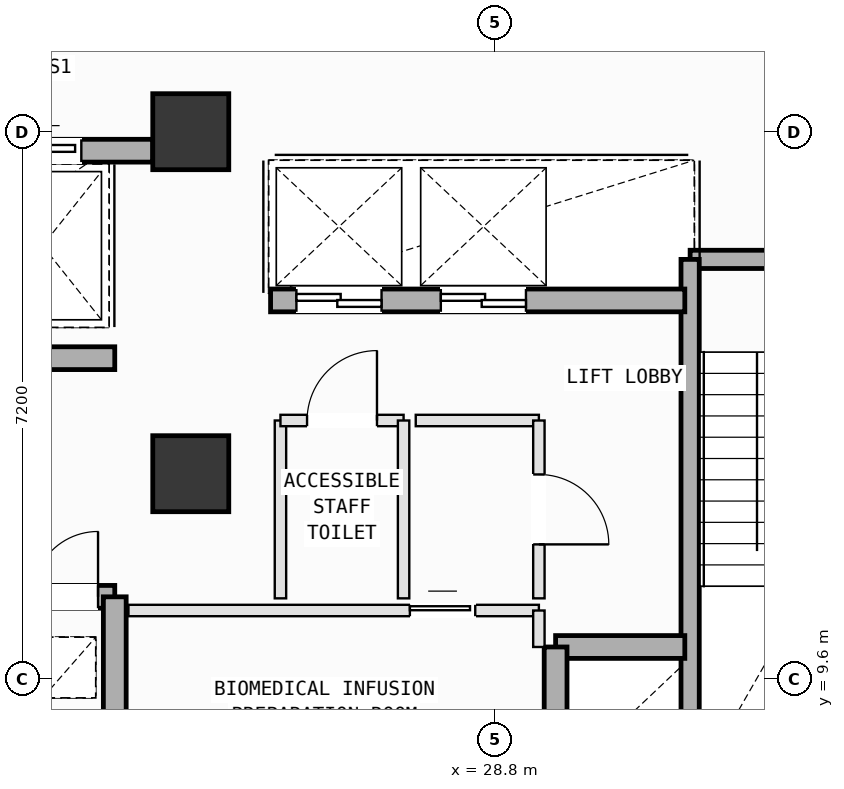
"""IFC4 building model, lengths in metres.
Left out: names, types, materials, properties, quantities, classifications, styles, units other than length and angle.
Written with IfcOpenShell. Run it as: python <this file> out.ifc"""

import sys

from ifc_helpers import new_model, si_unit, direction, frame, frame_2d, origin, origin_2d, place, context, subcontext, project, spatial, rectangle, extrude, element, fill, save


model = new_model("IFC4")
c1 = context("Model", 3, precision=1e-05, world=origin(), true_north=direction((0.0, 1.0)))
c2 = subcontext(c1, "Body", "Model", "MODEL_VIEW")
j1 = project(units=[si_unit("LENGTHUNIT", "METRE"), si_unit("PLANEANGLEUNIT", "RADIAN")], contexts=[c1])
p1 = place(None, origin())
s1 = spatial("IfcSite", under=j1, at=p1, CompositionType="ELEMENT")
p2 = place(p1, origin())
s2 = spatial("IfcBuilding", under=s1, at=p2, CompositionType="ELEMENT")
p3 = place(p2, frame((0.0, 0.0, 251.2)))
s3 = spatial("IfcBuildingStorey", under=s2, at=p3, CompositionType="ELEMENT", Elevation=251.2)
for number, where, z_axis, x_axis in (
    (1, (24.8, 12.3, 0.0), (0.0, 0.0, 1.0), (1.0, 0.0, 0.0)),
    (2, (24.8, 16.8, 0.0), (0.0, 0.0, 1.0), (1.0, 0.0, 0.0)),
):
    element("IfcColumn", number, at=place(p3, frame(where, z_axis=z_axis, x_axis=x_axis)), inside=s3, PredefinedType="COLUMN", context=c2, shape_type="SweptSolid", body=[
        extrude(rectangle(XDim=1.0, YDim=1.0, at=origin_2d()), origin(), (0.0, 0.0, 1.0), 4.0),
    ])
p4 = place(p3, frame((31.37, 15.12, 0.0), z_axis=(0.0, 0.0, 1.0), x_axis=(1.0, 0.0, 0.0)))
e3 = element("IfcWall", 3, at=p4, inside=s3, PredefinedType="SOLIDWALL", context=c2, shape_type="SweptSolid", body=[
    extrude(rectangle(XDim=3.46, YDim=0.24, at=frame_2d((1.73, 0.0))), origin(), (0.0, 0.0, 1.0), 3.78),
])
p5 = place(p4, frame((2.14, 0.0, 0.0)))
e4 = element("IfcOpeningElement", 4, at=p5, cuts=e3, PredefinedType="OPENING", context=c2, shape_type="SweptSolid", body=[
    extrude(rectangle(XDim=1.1, YDim=2.15, at=frame_2d((0.55, 1.075))), frame((0.0, 0.13, 0.0), z_axis=(0.0, -1.0, 0.0), x_axis=(1.0, 0.0, 0.0)), (0.0, 0.0, 1.0), 0.26),
])
p6 = place(p3, frame((31.37, 8.075, 0.0), z_axis=(0.0, 0.0, 1.0), x_axis=(0.0, 1.0, 0.0)))
e5 = element("IfcWall", 5, at=p6, inside=s3, PredefinedType="SOLIDWALL", context=c2, shape_type="SweptSolid", body=[
    extrude(rectangle(XDim=7.045, YDim=0.24, at=frame_2d((3.522, 0.0))), origin(), (0.0, 0.0, 1.0), 3.78),
])
p7 = place(p3, frame((19.85, 16.55, 0.0), z_axis=(0.0, 0.0, 1.0), x_axis=(1.0, 0.0, 0.0)))
e6 = element("IfcWall", 6, at=p7, inside=s3, PredefinedType="SOLIDWALL", context=c2, shape_type="SweptSolid", body=[
    extrude(rectangle(XDim=4.45, YDim=0.3, at=frame_2d((2.225, 0.0))), origin(), (0.0, 0.0, 1.0), 3.78),
])
p8 = place(p7, frame((0.475, 0.0, 0.0)))
e7 = element("IfcOpeningElement", 7, at=p8, cuts=e6, PredefinedType="OPENING", context=c2, shape_type="SweptSolid", body=[
    extrude(rectangle(XDim=1.25, YDim=2.18, at=frame_2d((0.625, 1.09))), frame((0.0, 0.16, 0.0), z_axis=(0.0, -1.0, 0.0), x_axis=(1.0, 0.0, 0.0)), (0.0, 0.0, 1.0), 0.32),
])
p9 = place(p7, frame((2.49, 0.0, 0.0)))
e8 = element("IfcOpeningElement", 8, at=p9, cuts=e6, PredefinedType="OPENING", context=c2, shape_type="SweptSolid", body=[
    extrude(rectangle(XDim=1.02, YDim=2.12, at=frame_2d((0.51, 1.06))), frame((0.0, 0.16, 0.0), z_axis=(0.0, -1.0, 0.0), x_axis=(1.0, 0.0, 0.0)), (0.0, 0.0, 1.0), 0.32),
])
p10 = place(p3, frame((18.5, 10.68, 0.0), z_axis=(0.0, 0.0, 1.0), x_axis=(1.0, 0.0, 0.0)))
e9 = element("IfcWall", 9, at=p10, inside=s3, PredefinedType="SOLIDWALL", context=c2, shape_type="SweptSolid", body=[
    extrude(rectangle(XDim=5.3, YDim=0.3, at=frame_2d((2.65, 0.0))), origin(), (0.0, 0.0, 1.0), 3.78),
])
p11 = place(p10, frame((4.22, 0.0, 0.0)))
e10 = element("IfcOpeningElement", 10, at=p11, cuts=e9, PredefinedType="OPENING", context=c2, shape_type="SweptSolid", body=[
    extrude(rectangle(XDim=0.86, YDim=2.06, at=frame_2d((0.43, 1.03))), frame((0.0, 0.16, 0.0), z_axis=(0.0, -1.0, 0.0), x_axis=(1.0, 0.0, 0.0)), (0.0, 0.0, 1.0), 0.32),
])
p12 = place(p10, frame((0.425, 0.0, 0.0)))
e11 = element("IfcOpeningElement", 11, at=p12, cuts=e9, PredefinedType="OPENING", context=c2, shape_type="SweptSolid", body=[
    extrude(rectangle(XDim=1.25, YDim=2.18, at=frame_2d((0.625, 1.09))), frame((0.0, 0.16, 0.0), z_axis=(0.0, -1.0, 0.0), x_axis=(1.0, 0.0, 0.0)), (0.0, 0.0, 1.0), 0.32),
])
p13 = place(p10, frame((2.525, 0.0, 0.0)))
e12 = element("IfcOpeningElement", 12, at=p13, cuts=e9, PredefinedType="OPENING", context=c2, shape_type="SweptSolid", body=[
    extrude(rectangle(XDim=1.25, YDim=2.18, at=frame_2d((0.625, 1.09))), frame((0.0, 0.16, 0.0), z_axis=(0.0, -1.0, 0.0), x_axis=(1.0, 0.0, 0.0)), (0.0, 0.0, 1.0), 0.32),
])
p14 = place(p3, frame((18.5, 13.82, 0.0), z_axis=(0.0, 0.0, 1.0), x_axis=(1.0, 0.0, 0.0)))
e13 = element("IfcWall", 13, at=p14, inside=s3, PredefinedType="SOLIDWALL", context=c2, shape_type="SweptSolid", body=[
    extrude(rectangle(XDim=5.3, YDim=0.3, at=frame_2d((2.65, 0.0))), origin(), (0.0, 0.0, 1.0), 3.78),
])
p15 = place(p14, frame((0.18, 0.0, 0.0)))
e14 = element("IfcOpeningElement", 14, at=p15, cuts=e13, PredefinedType="OPENING", context=c2, shape_type="SweptSolid", body=[
    extrude(rectangle(XDim=1.1, YDim=2.15, at=frame_2d((0.55, 1.075))), frame((0.0, 0.16, 0.0), z_axis=(0.0, -1.0, 0.0), x_axis=(1.0, 0.0, 0.0)), (0.0, 0.0, 1.0), 0.32),
])
p16 = place(p3, frame((23.8, 8.075, 0.0), z_axis=(0.0, 0.0, 1.0), x_axis=(0.0, 1.0, 0.0)))
e15 = element("IfcWall", 15, at=p16, inside=s3, PredefinedType="SOLIDWALL", context=c2, shape_type="SweptSolid", body=[
    extrude(rectangle(XDim=2.605, YDim=0.3, at=frame_2d((1.302, 0.0))), origin(), (0.0, 0.0, 1.0), 3.78),
])
p17 = place(p3, frame((29.6, 10.02, 0.0), z_axis=(0.0, 0.0, 1.0), x_axis=(1.0, 0.0, 0.0)))
e16 = element("IfcWall", 16, at=p17, inside=s3, PredefinedType="SOLIDWALL", context=c2, shape_type="SweptSolid", body=[
    extrude(rectangle(XDim=1.7, YDim=0.3, at=frame_2d((0.85, 0.0))), origin(), (0.0, 0.0, 1.0), 3.78),
])
p18 = place(p3, frame((29.6, 8.075, 0.0), z_axis=(0.0, 0.0, 1.0), x_axis=(0.0, 1.0, 0.0)))
e17 = element("IfcWall", 17, at=p18, inside=s3, PredefinedType="SOLIDWALL", context=c2, shape_type="SweptSolid", body=[
    extrude(rectangle(XDim=1.945, YDim=0.3, at=frame_2d((0.973, 0.0))), origin(), (0.0, 0.0, 1.0), 3.78),
])
p19 = place(p3, frame((25.85, 14.58, 0.0), z_axis=(0.0, 0.0, 1.0), x_axis=(1.0, 0.0, 0.0)))
e18 = element("IfcWall", 18, at=p19, inside=s3, PredefinedType="SOLIDWALL", context=c2, shape_type="SweptSolid", body=[
    extrude(rectangle(XDim=5.45, YDim=0.3, at=frame_2d((2.725, 0.0))), origin(), (0.0, 0.0, 1.0), 3.78),
])
p20 = place(p19, frame((0.34, 0.0, 0.0)))
e19 = element("IfcOpeningElement", 19, at=p20, cuts=e18, PredefinedType="OPENING", context=c2, shape_type="SweptSolid", body=[
    extrude(rectangle(XDim=1.12, YDim=2.15, at=frame_2d((0.56, 1.075))), frame((0.0, 0.16, 0.0), z_axis=(0.0, -1.0, 0.0), x_axis=(1.0, 0.0, 0.0)), (0.0, 0.0, 1.0), 0.32),
])
p21 = place(p19, frame((2.24, 0.0, 0.0)))
e20 = element("IfcOpeningElement", 20, at=p21, cuts=e18, PredefinedType="OPENING", context=c2, shape_type="SweptSolid", body=[
    extrude(rectangle(XDim=1.12, YDim=2.15, at=frame_2d((0.56, 1.075))), frame((0.0, 0.16, 0.0), z_axis=(0.0, -1.0, 0.0), x_axis=(1.0, 0.0, 0.0)), (0.0, 0.0, 1.0), 0.32),
])
p22 = place(p3, frame((23.98, 10.5, 0.0), z_axis=(0.0, 0.0, 1.0), x_axis=(1.0, 0.0, 0.0)))
e21 = element("IfcWall", 21, at=p22, inside=s3, PredefinedType="PARTITIONING", context=c2, shape_type="SweptSolid", body=[
    extrude(rectangle(XDim=5.4, YDim=0.15, at=frame_2d((2.7, 0.0))), origin(), (0.0, 0.0, 1.0), 3.78),
])
p23 = place(p22, frame((3.703, 0.0, 0.0)))
e22 = element("IfcOpeningElement", 22, at=p23, cuts=e21, PredefinedType="OPENING", context=c2, shape_type="SweptSolid", body=[
    extrude(rectangle(XDim=0.86, YDim=2.06, at=frame_2d((0.43, 1.03))), frame((0.0, 0.085, 0.0), z_axis=(0.0, -1.0, 0.0), x_axis=(1.0, 0.0, 0.0)), (0.0, 0.0, 1.0), 0.17),
])
p24 = place(p3, frame((29.38, 10.5, 0.0), z_axis=(0.0, 0.0, 1.0), x_axis=(0.0, -1.0, 0.0)))
e23 = element("IfcWall", 23, at=p24, inside=s3, PredefinedType="PARTITIONING", context=c2, shape_type="SweptSolid", body=[
    extrude(rectangle(XDim=0.48, YDim=0.15, at=frame_2d((0.24, 0.0))), origin(), (0.0, 0.0, 1.0), 3.78),
])
p25 = place(p3, frame((25.98, 10.66, 0.0), z_axis=(0.0, 0.0, 1.0), x_axis=(0.0, 1.0, 0.0)))
e24 = element("IfcWall", 24, at=p25, inside=s3, PredefinedType="PARTITIONING", context=c2, shape_type="SweptSolid", body=[
    extrude(rectangle(XDim=2.34, YDim=0.15, at=frame_2d((1.17, 0.0))), origin(), (0.0, 0.0, 1.0), 3.78),
])
p26 = place(p3, frame((25.98, 13.0, 0.0), z_axis=(0.0, 0.0, 1.0), x_axis=(1.0, 0.0, 0.0)))
e25 = element("IfcWall", 25, at=p26, inside=s3, PredefinedType="PARTITIONING", context=c2, shape_type="SweptSolid", body=[
    extrude(rectangle(XDim=1.62, YDim=0.15, at=frame_2d((0.81, 0.0))), origin(), (0.0, 0.0, 1.0), 3.78),
])
p27 = place(p26, frame((0.35, 0.0, 0.0)))
e26 = element("IfcOpeningElement", 26, at=p27, cuts=e25, PredefinedType="OPENING", context=c2, shape_type="SweptSolid", body=[
    extrude(rectangle(XDim=0.92, YDim=2.1, at=frame_2d((0.46, 1.05))), frame((0.0, 0.085, 0.0), z_axis=(0.0, -1.0, 0.0), x_axis=(1.0, 0.0, 0.0)), (0.0, 0.0, 1.0), 0.17),
])
p28 = place(p3, frame((27.6, 13.0, 0.0), z_axis=(0.0, 0.0, 1.0), x_axis=(0.0, -1.0, 0.0)))
e27 = element("IfcWall", 27, at=p28, inside=s3, PredefinedType="PARTITIONING", context=c2, shape_type="SweptSolid", body=[
    extrude(rectangle(XDim=2.34, YDim=0.15, at=frame_2d((1.17, 0.0))), origin(), (0.0, 0.0, 1.0), 3.78),
])
p29 = place(p3, frame((27.76, 13.0, 0.0), z_axis=(0.0, 0.0, 1.0), x_axis=(1.0, 0.0, 0.0)))
e28 = element("IfcWall", 28, at=p29, inside=s3, PredefinedType="PARTITIONING", context=c2, shape_type="SweptSolid", body=[
    extrude(rectangle(XDim=1.62, YDim=0.15, at=frame_2d((0.81, 0.0))), origin(), (0.0, 0.0, 1.0), 3.78),
])
p30 = place(p3, frame((29.38, 13.0, 0.0), z_axis=(0.0, 0.0, 1.0), x_axis=(0.0, -1.0, 0.0)))
e29 = element("IfcWall", 29, at=p30, inside=s3, PredefinedType="PARTITIONING", context=c2, shape_type="SweptSolid", body=[
    extrude(rectangle(XDim=2.34, YDim=0.15, at=frame_2d((1.17, 0.0))), origin(), (0.0, 0.0, 1.0), 3.78),
])
p31 = place(p30, frame((0.71, 0.0, 0.0)))
e30 = element("IfcOpeningElement", 30, at=p31, cuts=e29, PredefinedType="OPENING", context=c2, shape_type="SweptSolid", body=[
    extrude(rectangle(XDim=0.92, YDim=2.1, at=frame_2d((0.46, 1.05))), frame((0.0, 0.085, 0.0), z_axis=(0.0, -1.0, 0.0), x_axis=(1.0, 0.0, 0.0)), (0.0, 0.0, 1.0), 0.17),
])
p32 = place(p11, origin())
e31 = element("IfcDoor", 31, at=p32, inside=s3, OperationType="SINGLE_SWING_RIGHT", PredefinedType="DOOR", context=c2, shape_type="SweptSolid", body=[
    extrude(rectangle(XDim=0.86, YDim=2.06, at=frame_2d((0.43, 1.03))), frame((0.0, 0.025, 0.0), z_axis=(0.0, -1.0, 0.0), x_axis=(1.0, 0.0, 0.0)), (0.0, 0.0, 1.0), 0.05),
])
fill(e10, e31)
p33 = place(p20, origin())
e32 = element("IfcDoor", 32, at=p33, inside=s3, OperationType="DOUBLE_DOOR_SLIDING", PredefinedType="DOOR", context=c2, shape_type="SweptSolid", body=[
    extrude(rectangle(XDim=1.12, YDim=2.15, at=frame_2d((0.56, 1.075))), frame((0.0, 0.025, 0.0), z_axis=(0.0, -1.0, 0.0), x_axis=(1.0, 0.0, 0.0)), (0.0, 0.0, 1.0), 0.05),
])
fill(e19, e32)
p34 = place(p21, origin())
e33 = element("IfcDoor", 33, at=p34, inside=s3, OperationType="DOUBLE_DOOR_SLIDING", PredefinedType="DOOR", context=c2, shape_type="SweptSolid", body=[
    extrude(rectangle(XDim=1.12, YDim=2.15, at=frame_2d((0.56, 1.075))), frame((0.0, 0.025, 0.0), z_axis=(0.0, -1.0, 0.0), x_axis=(1.0, 0.0, 0.0)), (0.0, 0.0, 1.0), 0.05),
])
fill(e20, e33)
p35 = place(p9, origin())
e34 = element("IfcDoor", 34, at=p35, inside=s3, OperationType="SLIDING_TO_LEFT", PredefinedType="DOOR", context=c2, shape_type="SweptSolid", body=[
    extrude(rectangle(XDim=1.02, YDim=2.12, at=frame_2d((0.51, 1.06))), frame((0.0, 0.025, 0.0), z_axis=(0.0, -1.0, 0.0), x_axis=(1.0, 0.0, 0.0)), (0.0, 0.0, 1.0), 0.05),
])
fill(e8, e34)
p36 = place(p27, origin())
e35 = element("IfcDoor", 35, at=p36, inside=s3, OperationType="SINGLE_SWING_RIGHT", PredefinedType="DOOR", context=c2, shape_type="SweptSolid", body=[
    extrude(rectangle(XDim=0.92, YDim=2.1, at=frame_2d((0.46, 1.05))), frame((0.0, 0.025, 0.0), z_axis=(0.0, -1.0, 0.0), x_axis=(1.0, 0.0, 0.0)), (0.0, 0.0, 1.0), 0.05),
])
fill(e26, e35)
p37 = place(p31, origin())
e36 = element("IfcDoor", 36, at=p37, inside=s3, OperationType="SINGLE_SWING_RIGHT", PredefinedType="DOOR", context=c2, shape_type="SweptSolid", body=[
    extrude(rectangle(XDim=0.92, YDim=2.1, at=frame_2d((0.46, 1.05))), frame((0.0, 0.025, 0.0), z_axis=(0.0, -1.0, 0.0), x_axis=(1.0, 0.0, 0.0)), (0.0, 0.0, 1.0), 0.05),
])
fill(e30, e36)
p38 = place(p23, origin())
e37 = element("IfcDoor", 37, at=p38, inside=s3, OperationType="SLIDING_TO_LEFT", PredefinedType="DOOR", context=c2, shape_type="SweptSolid", body=[
    extrude(rectangle(XDim=0.86, YDim=2.06, at=frame_2d((0.43, 1.03))), frame((0.0, 0.025, 0.0), z_axis=(0.0, -1.0, 0.0), x_axis=(1.0, 0.0, 0.0)), (0.0, 0.0, 1.0), 0.05),
])
fill(e22, e37)
save(model, sys.argv[1])
